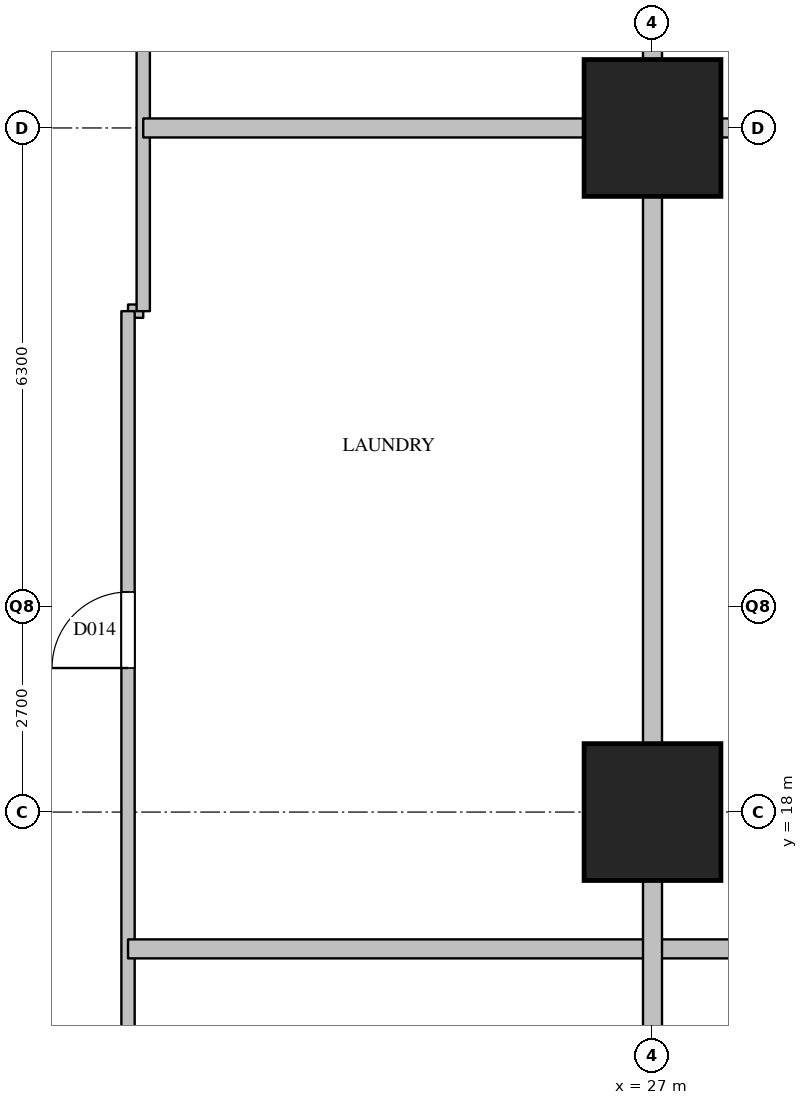
"""IFC4 building model, lengths in metres.
Left out: names, types, materials, properties, quantities, classifications, styles, units other than length and angle.
Written with IfcOpenShell. Run it as: python <this file> out.ifc"""

import sys

from ifc_helpers import new_model, si_unit, direction, frame, frame_2d, origin, origin_2d, place, context, subcontext, project, spatial, rectangle, extrude, element, fill, save


model = new_model("IFC4")
c1 = context("Model", 3, precision=1e-05, world=origin(), true_north=direction((0.0, 1.0)))
c2 = subcontext(c1, "Body", "Model", "MODEL_VIEW")
j1 = project(units=[si_unit("LENGTHUNIT", "METRE"), si_unit("PLANEANGLEUNIT", "RADIAN")], contexts=[c1])
p1 = place(None, origin())
s1 = spatial("IfcSite", under=j1, at=p1, CompositionType="ELEMENT")
p2 = place(p1, origin())
s2 = spatial("IfcBuilding", under=s1, at=p2, CompositionType="ELEMENT")
p3 = place(p2, frame((0.0, 0.0, 61.4)))
s3 = spatial("IfcBuildingStorey", under=s2, at=p3, CompositionType="ELEMENT", Elevation=61.4)
for number, where, z_axis, x_axis in (
    (1, (27.0, 18.0, 0.0), (0.0, 0.0, 1.0), (1.0, 0.0, 0.0)),
    (2, (27.0, 27.0, 0.0), (0.0, 0.0, 1.0), (1.0, 0.0, 0.0)),
):
    element("IfcColumn", number, at=place(p3, frame(where, z_axis=z_axis, x_axis=x_axis)), inside=s3, PredefinedType="COLUMN", context=c2, shape_type="SweptSolid", body=[
        extrude(rectangle(XDim=1.8, YDim=1.8, at=origin_2d()), origin(), (0.0, 0.0, 1.0), 3.8),
    ])
p4 = place(p3, frame((20.1, 24.59, 0.0), z_axis=(0.0, 0.0, 1.0), x_axis=(1.0, 0.0, 0.0)))
e3 = element("IfcWall", 3, at=p4, inside=s3, PredefinedType="PARTITIONING", context=c2, shape_type="SweptSolid", body=[
    extrude(rectangle(XDim=0.2, YDim=0.175, at=frame_2d((0.1, 0.0))), origin(), (0.0, 0.0, 1.0), 3.5),
])
p5 = place(p3, frame((20.1, 6.9, 0.0), z_axis=(0.0, 0.0, 1.0), x_axis=(0.0, 1.0, 0.0)))
e4 = element("IfcWall", 4, at=p5, inside=s3, PredefinedType="PARTITIONING", context=c2, shape_type="SweptSolid", body=[
    extrude(rectangle(XDim=17.69, YDim=0.175, at=frame_2d((8.845, 0.0))), origin(), (0.0, 0.0, 1.0), 3.5),
])
p6 = place(p5, frame((4.2, 0.0, 0.0)))
e5 = element("IfcOpeningElement", 5, at=p6, cuts=e4, PredefinedType="OPENING", context=c2, shape_type="SweptSolid", body=[
    extrude(rectangle(XDim=0.9, YDim=2.1, at=frame_2d((0.45, 1.05))), frame((0.0, 0.097, 0.0), z_axis=(0.0, -1.0, 0.0), x_axis=(1.0, 0.0, 0.0)), (0.0, 0.0, 1.0), 0.195),
])
p7 = place(p5, frame((12.995, 0.0, 0.0)))
e6 = element("IfcOpeningElement", 6, at=p7, cuts=e4, PredefinedType="OPENING", context=c2, shape_type="SweptSolid", body=[
    extrude(rectangle(XDim=1.0, YDim=2.1, at=frame_2d((0.5, 1.05))), frame((0.0, 0.097, 0.0), z_axis=(0.0, -1.0, 0.0), x_axis=(1.0, 0.0, 0.0)), (0.0, 0.0, 1.0), 0.195),
])
p8 = place(p3, frame((20.3, 24.59, 0.0), z_axis=(0.0, 0.0, 1.0), x_axis=(0.0, 1.0, 0.0)))
e7 = element("IfcWall", 7, at=p8, inside=s3, PredefinedType="PARTITIONING", context=c2, shape_type="SweptSolid", body=[
    extrude(rectangle(XDim=3.93, YDim=0.175, at=frame_2d((1.965, 0.0))), origin(), (0.0, 0.0, 1.0), 2.5),
])
p9 = place(p3, frame((20.1, 16.2, 0.0), z_axis=(0.0, 0.0, 1.0), x_axis=(1.0, 0.0, 0.0)))
e8 = element("IfcWall", 8, at=p9, inside=s3, PredefinedType="PARTITIONING", context=c2, shape_type="SweptSolid", body=[
    extrude(rectangle(XDim=13.8, YDim=0.25, at=frame_2d((6.9, 0.0))), origin(), (0.0, 0.0, 1.0), 2.5),
])
p10 = place(p3, frame((20.3, 27.0, 0.0), z_axis=(0.0, 0.0, 1.0), x_axis=(1.0, 0.0, 0.0)))
e9 = element("IfcWall", 9, at=p10, inside=s3, PredefinedType="PARTITIONING", context=c2, shape_type="SweptSolid", body=[
    extrude(rectangle(XDim=13.4, YDim=0.25, at=frame_2d((6.7, 0.0))), origin(), (0.0, 0.0, 1.0), 2.5),
])
p11 = place(p3, frame((27.0, 0.0, 0.0), z_axis=(0.0, 0.0, 1.0), x_axis=(0.0, 1.0, 0.0)))
e10 = element("IfcWall", 10, at=p11, inside=s3, PredefinedType="PARTITIONING", context=c2, shape_type="SweptSolid", body=[
    extrude(rectangle(XDim=54.0, YDim=0.25, at=frame_2d((27.0, 0.0))), origin(), (0.0, 0.0, 1.0), 2.5),
])
p12 = place(p7, origin())
e11 = element("IfcDoor", 11, at=p12, inside=s3, OperationType="SINGLE_SWING_LEFT", PredefinedType="DOOR", context=c2, shape_type="SweptSolid", body=[
    extrude(rectangle(XDim=1.0, YDim=2.1, at=frame_2d((0.5, 1.05))), frame((0.0, 0.025, 0.0), z_axis=(0.0, -1.0, 0.0), x_axis=(1.0, 0.0, 0.0)), (0.0, 0.0, 1.0), 0.05),
])
fill(e6, e11)
save(model, sys.argv[1])
